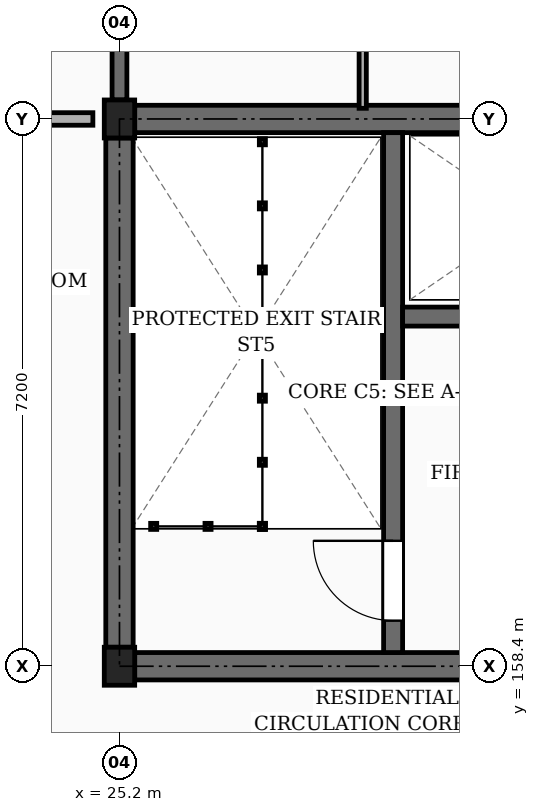
"""IFC4 building model, lengths in metres.
Left out: names, types, materials, properties, quantities, classifications, styles, units other than length and angle.
Written with IfcOpenShell. Run it as: python <this file> out.ifc"""

import sys

from ifc_helpers import new_model, si_unit, direction, frame, frame_2d, origin, origin_2d, place, context, subcontext, project, spatial, rectangle, extrude, element, fill, save


model = new_model("IFC4")
c1 = context("Model", 3, precision=1e-05, world=origin(), true_north=direction((0.0, 1.0)))
c2 = subcontext(c1, "Body", "Model", "MODEL_VIEW")
j1 = project(units=[si_unit("LENGTHUNIT", "METRE"), si_unit("PLANEANGLEUNIT", "RADIAN")], contexts=[c1])
p1 = place(None, origin())
s1 = spatial("IfcSite", under=j1, at=p1, CompositionType="ELEMENT")
p2 = place(p1, origin())
s2 = spatial("IfcBuilding", under=s1, at=p2, CompositionType="ELEMENT")
p3 = place(p2, frame((0.0, 0.0, 42.3)))
s3 = spatial("IfcBuildingStorey", under=s2, at=p3, CompositionType="ELEMENT", Elevation=42.3)
for number, where, z_axis, x_axis in (
    (1, (25.2, 158.4, 0.0), (0.0, 0.0, 1.0), (1.0, 0.0, 0.0)),
    (2, (25.2, 165.6, 0.0), (0.0, 0.0, 1.0), (1.0, 0.0, 0.0)),
):
    element("IfcColumn", number, at=place(p3, frame(where, z_axis=z_axis, x_axis=x_axis)), inside=s3, PredefinedType="COLUMN", context=c2, shape_type="SweptSolid", body=[
        extrude(rectangle(XDim=0.4, YDim=0.5, at=origin_2d()), origin(), (0.0, 0.0, 1.0), 3.15),
    ])
p4 = place(p3, frame((25.2, 165.85, 0.0), z_axis=(0.0, 0.0, 1.0), x_axis=(0.0, 1.0, 0.0)))
e3 = element("IfcWall", 3, at=p4, inside=s3, PredefinedType="SOLIDWALL", context=c2, shape_type="SweptSolid", body=[
    extrude(rectangle(XDim=6.725, YDim=0.195, at=frame_2d((3.362, 0.0))), origin(), (0.0, 0.0, 1.0), 2.22),
])
p5 = place(p4, frame((4.15, 0.0, 0.0)))
e4 = element("IfcOpeningElement", 4, at=p5, cuts=e3, PredefinedType="OPENING", context=c2, shape_type="SweptSolid", body=[
    extrude(rectangle(XDim=0.98, YDim=2.12, at=frame_2d((0.49, 1.06))), frame((0.0, 0.107, 0.0), z_axis=(0.0, -1.0, 0.0), x_axis=(1.0, 0.0, 0.0)), (0.0, 0.0, 1.0), 0.215),
])
p6 = place(p3, frame((25.2, 158.65, 0.0), z_axis=(0.0, 0.0, 1.0), x_axis=(0.0, 1.0, 0.0)))
e5 = element("IfcWall", 5, at=p6, inside=s3, PredefinedType="SHEAR", context=c2, shape_type="SweptSolid", body=[
    extrude(rectangle(XDim=6.7, YDim=0.36, at=frame_2d((3.35, 0.0))), origin(), (0.0, 0.0, 1.0), 2.89),
])
p7 = place(p3, frame((25.4, 165.6, 0.0), z_axis=(0.0, 0.0, 1.0), x_axis=(1.0, 0.0, 0.0)))
e6 = element("IfcWall", 6, at=p7, inside=s3, PredefinedType="SHEAR", context=c2, shape_type="SweptSolid", body=[
    extrude(rectangle(XDim=6.8, YDim=0.36, at=frame_2d((3.4, 0.0))), origin(), (0.0, 0.0, 1.0), 2.89),
])
p8 = place(p3, frame((25.4, 158.4, 0.0), z_axis=(0.0, 0.0, 1.0), x_axis=(1.0, 0.0, 0.0)))
e7 = element("IfcWall", 7, at=p8, inside=s3, PredefinedType="SHEAR", context=c2, shape_type="SweptSolid", body=[
    extrude(rectangle(XDim=6.8, YDim=0.36, at=frame_2d((3.4, 0.0))), origin(), (0.0, 0.0, 1.0), 2.89),
])
p9 = place(p8, frame((4.55, 0.0, 0.0)))
e8 = element("IfcOpeningElement", 8, at=p9, cuts=e7, PredefinedType="OPENING", context=c2, shape_type="SweptSolid", body=[
    extrude(rectangle(XDim=1.1, YDim=2.15, at=frame_2d((0.55, 1.075))), frame((0.0, 0.19, 0.0), z_axis=(0.0, -1.0, 0.0), x_axis=(1.0, 0.0, 0.0)), (0.0, 0.0, 1.0), 0.38),
])
p10 = place(p3, frame((28.8, 158.58, 0.0), z_axis=(0.0, 0.0, 1.0), x_axis=(0.0, 1.0, 0.0)))
e9 = element("IfcWall", 9, at=p10, inside=s3, PredefinedType="SHEAR", context=c2, shape_type="SweptSolid", body=[
    extrude(rectangle(XDim=6.84, YDim=0.25, at=frame_2d((3.42, 0.0))), origin(), (0.0, 0.0, 1.0), 2.89),
])
p11 = place(p10, frame((0.42, 0.0, 0.0)))
e10 = element("IfcOpeningElement", 10, at=p11, cuts=e9, PredefinedType="OPENING", context=c2, shape_type="SweptSolid", body=[
    extrude(rectangle(XDim=1.05, YDim=2.15, at=frame_2d((0.525, 1.075))), frame((0.0, 0.135, 0.0), z_axis=(0.0, -1.0, 0.0), x_axis=(1.0, 0.0, 0.0)), (0.0, 0.0, 1.0), 0.27),
])
p12 = place(p3, frame((28.925, 163.0, 0.0), z_axis=(0.0, 0.0, 1.0), x_axis=(1.0, 0.0, 0.0)))
e11 = element("IfcWall", 11, at=p12, inside=s3, PredefinedType="SHEAR", context=c2, shape_type="SweptSolid", body=[
    extrude(rectangle(XDim=3.295, YDim=0.25, at=frame_2d((1.647, 0.0))), origin(), (0.0, 0.0, 1.0), 2.89),
])
p13 = place(p12, frame((1.1, 0.0, 0.0)))
e12 = element("IfcOpeningElement", 12, at=p13, cuts=e11, PredefinedType="OPENING", context=c2, shape_type="SweptSolid", body=[
    extrude(rectangle(XDim=1.1, YDim=2.2, at=frame_2d((0.55, 1.1))), frame((0.0, 0.135, 0.0), z_axis=(0.0, -1.0, 0.0), x_axis=(1.0, 0.0, 0.0)), (0.0, 0.0, 1.0), 0.27),
])
p14 = place(p3, frame((18.35, 165.6, 0.0), z_axis=(0.0, 0.0, 1.0), x_axis=(1.0, 0.0, 0.0)))
e13 = element("IfcWall", 13, at=p14, inside=s3, PredefinedType="PARTITIONING", context=c2, shape_type="SweptSolid", body=[
    extrude(rectangle(XDim=6.5, YDim=0.165, at=frame_2d((3.25, 0.0))), origin(), (0.0, 0.0, 1.0), 2.325),
])
p15 = place(p14, frame((1.0, 0.0, 0.0)))
e14 = element("IfcOpeningElement", 14, at=p15, cuts=e13, PredefinedType="OPENING", context=c2, shape_type="SweptSolid", body=[
    extrude(rectangle(XDim=1.14, YDim=2.18, at=frame_2d((0.57, 1.09))), frame((0.0, 0.093, 0.0), z_axis=(0.0, -1.0, 0.0), x_axis=(1.0, 0.0, 0.0)), (0.0, 0.0, 1.0), 0.185),
])
p16 = place(p3, frame((28.4, 165.74, 0.0), z_axis=(0.0, 0.0, 1.0), x_axis=(0.0, 1.0, 0.0)))
e15 = element("IfcWall", 15, at=p16, inside=s3, PredefinedType="PARTITIONING", context=c2, shape_type="SweptSolid", body=[
    extrude(rectangle(XDim=3.39, YDim=0.095, at=frame_2d((1.695, 0.0))), origin(), (0.0, 0.0, 1.0), 2.325),
])
p17 = place(p11, origin())
e16 = element("IfcDoor", 16, at=p17, inside=s3, OperationType="SINGLE_SWING_RIGHT", PredefinedType="DOOR", context=c2, shape_type="SweptSolid", body=[
    extrude(rectangle(XDim=1.05, YDim=2.15, at=frame_2d((0.525, 1.075))), frame((0.0, 0.025, 0.0), z_axis=(0.0, -1.0, 0.0), x_axis=(1.0, 0.0, 0.0)), (0.0, 0.0, 1.0), 0.05),
])
fill(e10, e16)
save(model, sys.argv[1])
